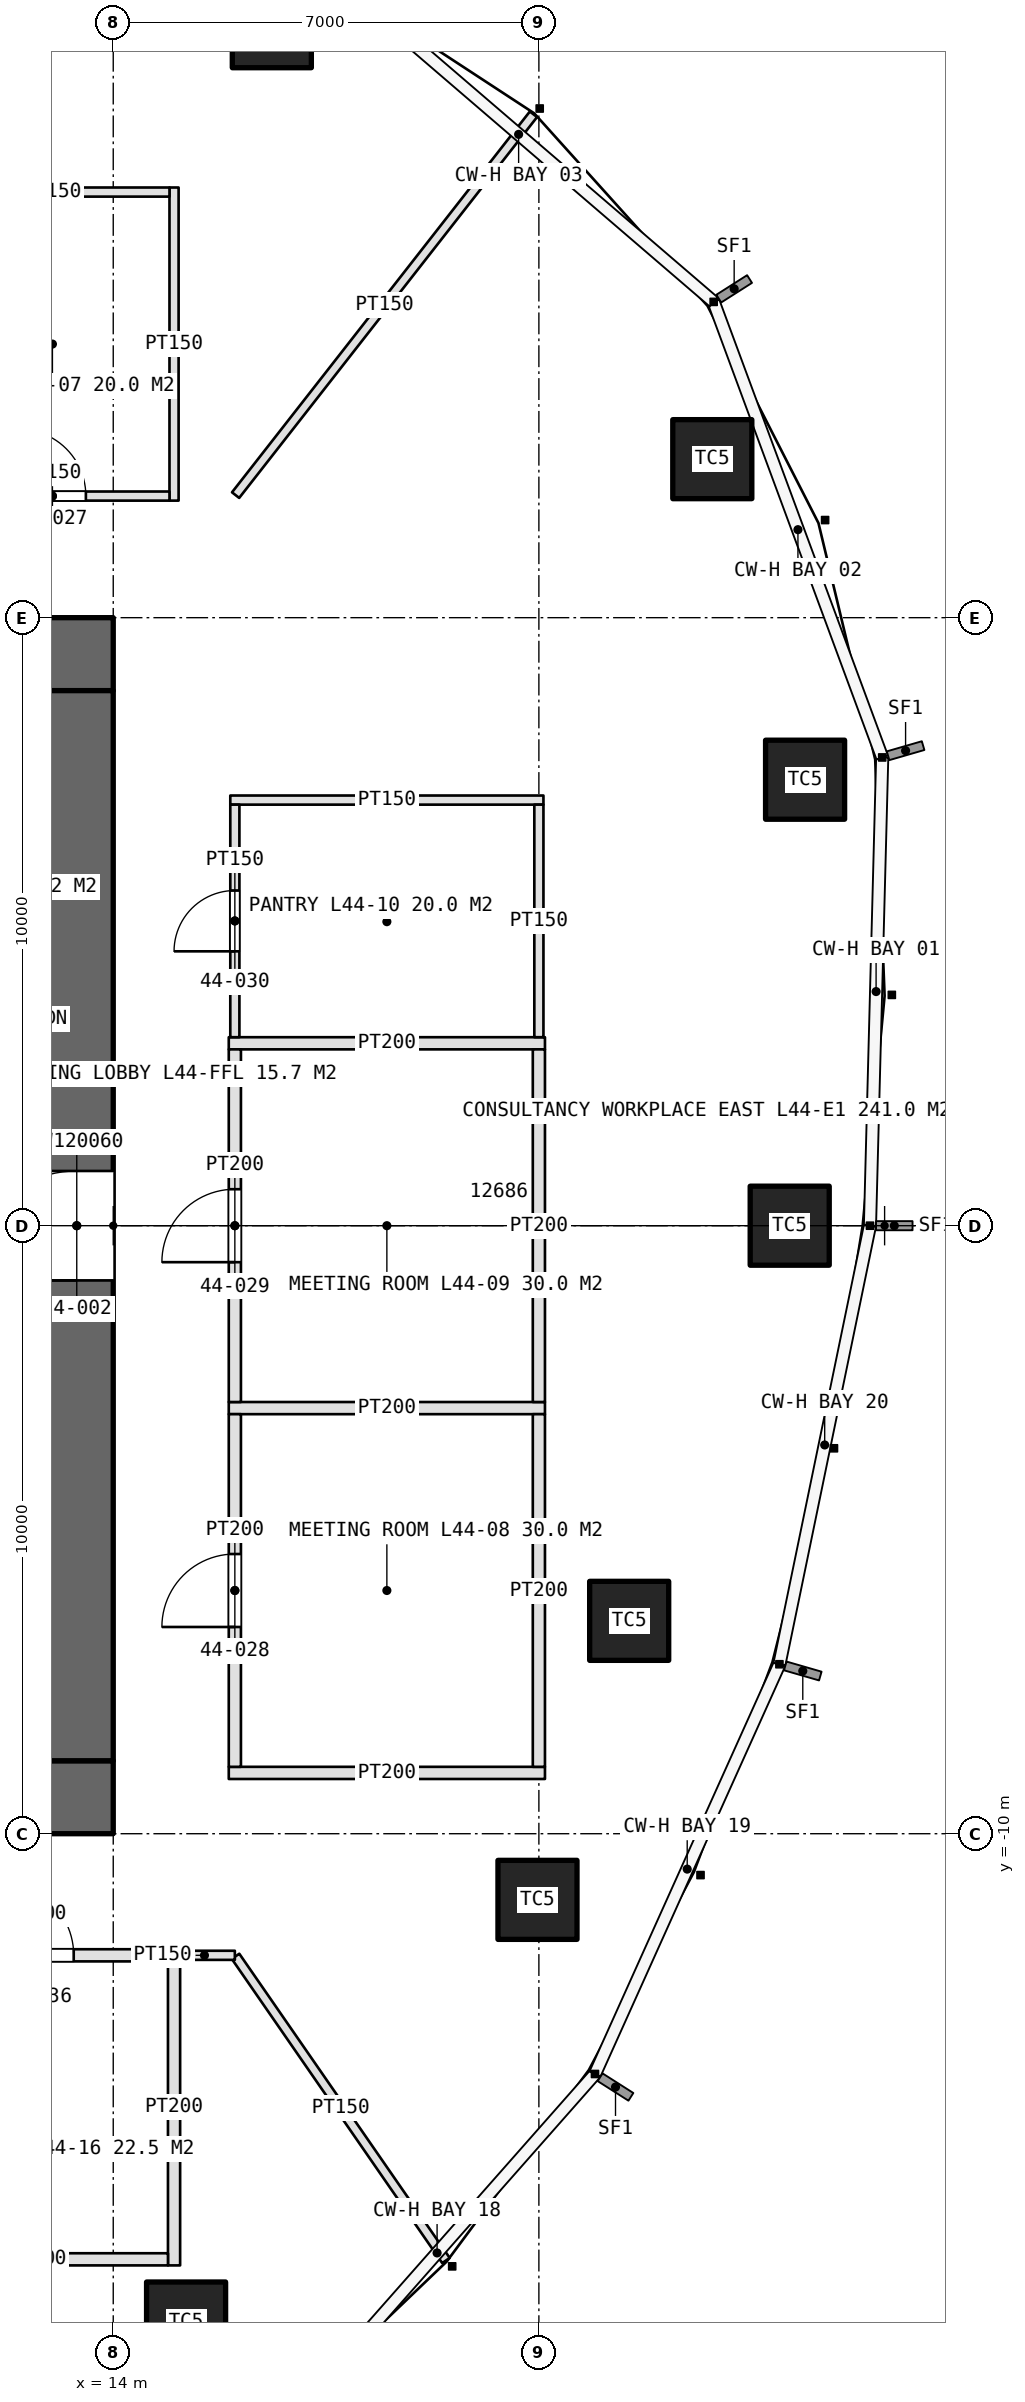
"""IFC4 building model, lengths in metres.
Left out: names, types, materials, properties, quantities, classifications, styles, units other than length and angle.
Written with IfcOpenShell. Run it as: python <this file> out.ifc"""

import sys

from ifc_helpers import new_model, si_unit, direction, frame, frame_2d, origin, origin_2d, place, context, subcontext, project, spatial, rectangle, extrude, element, fill, save


model = new_model("IFC4")
c1 = context("Model", 3, precision=1e-05, world=origin(), true_north=direction((0.0, 1.0)))
c2 = subcontext(c1, "Body", "Model", "MODEL_VIEW")
j1 = project(units=[si_unit("LENGTHUNIT", "METRE"), si_unit("PLANEANGLEUNIT", "RADIAN")], contexts=[c1])
p1 = place(None, origin())
s1 = spatial("IfcSite", under=j1, at=p1, CompositionType="ELEMENT")
p2 = place(p1, origin())
s2 = spatial("IfcBuilding", under=s1, at=p2, CompositionType="ELEMENT")
p3 = place(p2, frame((0.0, 0.0, 203.2)))
s3 = spatial("IfcBuildingStorey", under=s2, at=p3, CompositionType="ELEMENT", Elevation=203.2)
p4 = place(p3, frame((-14.0, -9.4, 0.0), z_axis=(0.0, 0.0, 1.0), x_axis=(1.0, 0.0, 0.0)))
e1 = element("IfcWall", 1, at=p4, inside=s3, PredefinedType="SHEAR", context=c2, shape_type="SweptSolid", body=[
    extrude(rectangle(XDim=28.0, YDim=1.2, at=frame_2d((14.0, 0.0))), origin(), (0.0, 0.0, 1.0), 4.2),
])
p5 = place(p4, frame((22.9, 0.0, 0.0)))
e2 = element("IfcOpeningElement", 2, at=p5, cuts=e1, PredefinedType="OPENING", context=c2, shape_type="SweptSolid", body=[
    extrude(rectangle(XDim=2.2, YDim=2.7, at=frame_2d((1.1, 1.35))), frame((0.0, 0.61, 0.0), z_axis=(0.0, -1.0, 0.0), x_axis=(1.0, 0.0, 0.0)), (0.0, 0.0, 1.0), 1.22),
])
p6 = place(p3, frame((14.0, 9.4, 0.0), z_axis=(0.0, 0.0, 1.0), x_axis=(-1.0, 0.0, 0.0)))
e3 = element("IfcWall", 3, at=p6, inside=s3, PredefinedType="SHEAR", context=c2, shape_type="SweptSolid", body=[
    extrude(rectangle(XDim=28.0, YDim=1.2, at=frame_2d((14.0, 0.0))), origin(), (0.0, 0.0, 1.0), 4.2),
])
p7 = place(p6, frame((24.0, 0.0, 0.0)))
e4 = element("IfcOpeningElement", 4, at=p7, cuts=e3, PredefinedType="OPENING", context=c2, shape_type="SweptSolid", body=[
    extrude(rectangle(XDim=1.0, YDim=2.4, at=frame_2d((0.5, 1.2))), frame((0.0, 0.61, 0.0), z_axis=(0.0, -1.0, 0.0), x_axis=(1.0, 0.0, 0.0)), (0.0, 0.0, 1.0), 1.22),
])
p8 = place(p3, frame((13.4, -8.8, 0.0), z_axis=(0.0, 0.0, 1.0), x_axis=(0.0, 1.0, 0.0)))
e5 = element("IfcWall", 5, at=p8, inside=s3, PredefinedType="SHEAR", context=c2, shape_type="SweptSolid", body=[
    extrude(rectangle(XDim=17.6, YDim=1.2, at=frame_2d((8.8, 0.0))), origin(), (0.0, 0.0, 1.0), 4.2),
])
p9 = place(p8, frame((7.9, 0.0, 0.0)))
e6 = element("IfcOpeningElement", 6, at=p9, cuts=e5, PredefinedType="OPENING", context=c2, shape_type="SweptSolid", body=[
    extrude(rectangle(XDim=1.8, YDim=2.4, at=frame_2d((0.9, 1.2))), frame((0.0, 0.61, 0.0), z_axis=(0.0, -1.0, 0.0), x_axis=(1.0, 0.0, 0.0)), (0.0, 0.0, 1.0), 1.22),
])
for number, where, z_axis, x_axis in (
    (7, (25.125, 0.0, 0.0), (0.0, 0.0, 1.0), (1.0, 0.0, 0.0)),
    (8, (25.378, 7.335, 0.0), (0.0, 0.0, 1.0), (1.0, 0.0, 0.0)),
    (9, (23.852, 12.607, 0.0), (0.0, 0.0, 1.0), (1.0, 0.0, 0.0)),
    (10, (16.608, 19.695, 0.0), (0.0, 0.0, 1.0), (1.0, 0.0, 0.0)),
    (11, (15.198, -18.023, 0.0), (0.0, 0.0, 1.0), (1.0, 0.0, 0.0)),
    (12, (20.977, -11.088, 0.0), (0.0, 0.0, 1.0), (1.0, 0.0, 0.0)),
    (13, (22.485, -6.499, 0.0), (0.0, 0.0, 1.0), (1.0, 0.0, 0.0)),
):
    element("IfcColumn", number, at=place(p3, frame(where, z_axis=z_axis, x_axis=x_axis)), inside=s3, PredefinedType="COLUMN", context=c2, shape_type="SweptSolid", body=[
        extrude(rectangle(XDim=1.3, YDim=1.3, at=origin_2d()), origin(), (0.0, 0.0, 1.0), 4.2),
    ])
p10 = place(p3, frame((15.0, 11.925, 0.0), z_axis=(0.0, 0.0, 1.0), x_axis=(0.0, 1.0, 0.0)))
e14 = element("IfcWall", 14, at=p10, inside=s3, PredefinedType="PARTITIONING", context=c2, shape_type="SweptSolid", body=[
    extrude(rectangle(XDim=5.15, YDim=0.15, at=frame_2d((2.575, 0.0))), origin(), (0.0, 0.0, 1.0), 3.0),
])
p11 = place(p3, frame((11.075, 12.0, 0.0), z_axis=(0.0, 0.0, 1.0), x_axis=(1.0, 0.0, 0.0)))
e15 = element("IfcWall", 15, at=p11, inside=s3, PredefinedType="PARTITIONING", context=c2, shape_type="SweptSolid", body=[
    extrude(rectangle(XDim=3.85, YDim=0.15, at=frame_2d((1.925, 0.0))), origin(), (0.0, 0.0, 1.0), 3.0),
])
p12 = place(p11, frame((1.375, 0.0, 0.0)))
e16 = element("IfcOpeningElement", 16, at=p12, cuts=e15, PredefinedType="OPENING", context=c2, shape_type="SweptSolid", body=[
    extrude(rectangle(XDim=1.1, YDim=2.3, at=frame_2d((0.55, 1.15))), frame((0.0, 0.085, 0.0), z_axis=(0.0, -1.0, 0.0), x_axis=(1.0, 0.0, 0.0)), (0.0, 0.0, 1.0), 0.17),
])
p13 = place(p3, frame((11.075, 17.0, 0.0), z_axis=(0.0, 0.0, 1.0), x_axis=(1.0, 0.0, 0.0)))
e17 = element("IfcWall", 17, at=p13, inside=s3, PredefinedType="PARTITIONING", context=c2, shape_type="SweptSolid", body=[
    extrude(rectangle(XDim=3.85, YDim=0.15, at=frame_2d((1.925, 0.0))), origin(), (0.0, 0.0, 1.0), 3.0),
])
for number, where, z_axis, x_axis in (
    (18, (15.9, -9.0, 0.0), (0.0, 0.0, 1.0), (1.0, 0.0, 0.0)),
    (19, (15.9, -3.0, 0.0), (0.0, 0.0, 1.0), (1.0, 0.0, 0.0)),
    (20, (15.9, 3.0, 0.0), (0.0, 0.0, 1.0), (1.0, 0.0, 0.0)),
):
    element("IfcWall", number, at=place(p3, frame(where, z_axis=z_axis, x_axis=x_axis)), inside=s3, PredefinedType="PARTITIONING", context=c2, shape_type="SweptSolid", body=[
        extrude(rectangle(XDim=5.2, YDim=0.2, at=frame_2d((2.6, 0.0))), origin(), (0.0, 0.0, 1.0), 3.0),
    ])
p14 = place(p3, frame((15.925, 7.0, 0.0), z_axis=(0.0, 0.0, 1.0), x_axis=(1.0, 0.0, 0.0)))
e21 = element("IfcWall", 21, at=p14, inside=s3, PredefinedType="PARTITIONING", context=c2, shape_type="SweptSolid", body=[
    extrude(rectangle(XDim=5.15, YDim=0.15, at=frame_2d((2.575, 0.0))), origin(), (0.0, 0.0, 1.0), 3.0),
])
p15 = place(p3, frame((16.0, -8.9, 0.0), z_axis=(0.0, 0.0, 1.0), x_axis=(0.0, 1.0, 0.0)))
e22 = element("IfcWall", 22, at=p15, inside=s3, PredefinedType="PARTITIONING", context=c2, shape_type="SweptSolid", body=[
    extrude(rectangle(XDim=5.8, YDim=0.2, at=frame_2d((2.9, 0.0))), origin(), (0.0, 0.0, 1.0), 3.0),
])
p16 = place(p15, frame((2.3, 0.0, 0.0)))
e23 = element("IfcOpeningElement", 23, at=p16, cuts=e22, PredefinedType="OPENING", context=c2, shape_type="SweptSolid", body=[
    extrude(rectangle(XDim=1.2, YDim=2.4, at=frame_2d((0.6, 1.2))), frame((0.0, 0.11, 0.0), z_axis=(0.0, -1.0, 0.0), x_axis=(1.0, 0.0, 0.0)), (0.0, 0.0, 1.0), 0.22),
])
p17 = place(p3, frame((21.0, -8.9, 0.0), z_axis=(0.0, 0.0, 1.0), x_axis=(0.0, 1.0, 0.0)))
e24 = element("IfcWall", 24, at=p17, inside=s3, PredefinedType="PARTITIONING", context=c2, shape_type="SweptSolid", body=[
    extrude(rectangle(XDim=5.8, YDim=0.2, at=frame_2d((2.9, 0.0))), origin(), (0.0, 0.0, 1.0), 3.0),
])
p18 = place(p3, frame((16.0, -2.9, 0.0), z_axis=(0.0, 0.0, 1.0), x_axis=(0.0, 1.0, 0.0)))
e25 = element("IfcWall", 25, at=p18, inside=s3, PredefinedType="PARTITIONING", context=c2, shape_type="SweptSolid", body=[
    extrude(rectangle(XDim=5.8, YDim=0.2, at=frame_2d((2.9, 0.0))), origin(), (0.0, 0.0, 1.0), 3.0),
])
p19 = place(p18, frame((2.3, 0.0, 0.0)))
e26 = element("IfcOpeningElement", 26, at=p19, cuts=e25, PredefinedType="OPENING", context=c2, shape_type="SweptSolid", body=[
    extrude(rectangle(XDim=1.2, YDim=2.4, at=frame_2d((0.6, 1.2))), frame((0.0, 0.11, 0.0), z_axis=(0.0, -1.0, 0.0), x_axis=(1.0, 0.0, 0.0)), (0.0, 0.0, 1.0), 0.22),
])
p20 = place(p3, frame((21.0, -2.9, 0.0), z_axis=(0.0, 0.0, 1.0), x_axis=(0.0, 1.0, 0.0)))
e27 = element("IfcWall", 27, at=p20, inside=s3, PredefinedType="PARTITIONING", context=c2, shape_type="SweptSolid", body=[
    extrude(rectangle(XDim=5.8, YDim=0.2, at=frame_2d((2.9, 0.0))), origin(), (0.0, 0.0, 1.0), 3.0),
])
p21 = place(p3, frame((16.0, 3.1, 0.0), z_axis=(0.0, 0.0, 1.0), x_axis=(0.0, 1.0, 0.0)))
e28 = element("IfcWall", 28, at=p21, inside=s3, PredefinedType="PARTITIONING", context=c2, shape_type="SweptSolid", body=[
    extrude(rectangle(XDim=3.825, YDim=0.15, at=frame_2d((1.913, 0.0))), origin(), (0.0, 0.0, 1.0), 3.0),
])
p22 = place(p21, frame((1.413, 0.0, 0.0)))
e29 = element("IfcOpeningElement", 29, at=p22, cuts=e28, PredefinedType="OPENING", context=c2, shape_type="SweptSolid", body=[
    extrude(rectangle(XDim=1.0, YDim=2.2, at=frame_2d((0.5, 1.1))), frame((0.0, 0.085, 0.0), z_axis=(0.0, -1.0, 0.0), x_axis=(1.0, 0.0, 0.0)), (0.0, 0.0, 1.0), 0.17),
])
p23 = place(p3, frame((21.0, 3.1, 0.0), z_axis=(0.0, 0.0, 1.0), x_axis=(0.0, 1.0, 0.0)))
e30 = element("IfcWall", 30, at=p23, inside=s3, PredefinedType="PARTITIONING", context=c2, shape_type="SweptSolid", body=[
    extrude(rectangle(XDim=3.825, YDim=0.15, at=frame_2d((1.913, 0.0))), origin(), (0.0, 0.0, 1.0), 3.0),
])
p24 = place(p3, frame((15.0, -11.9, 0.0), z_axis=(0.0, 0.0, 1.0), x_axis=(0.0, -1.0, 0.0)))
e31 = element("IfcWall", 31, at=p24, inside=s3, PredefinedType="PARTITIONING", context=c2, shape_type="SweptSolid", body=[
    extrude(rectangle(XDim=5.2, YDim=0.2, at=frame_2d((2.6, 0.0))), origin(), (0.0, 0.0, 1.0), 3.0),
])
p25 = place(p3, frame((10.6, -12.0, 0.0), z_axis=(0.0, 0.0, 1.0), x_axis=(1.0, 0.0, 0.0)))
e32 = element("IfcWall", 32, at=p25, inside=s3, PredefinedType="PARTITIONING", context=c2, shape_type="SweptSolid", body=[
    extrude(rectangle(XDim=4.3, YDim=0.2, at=frame_2d((2.15, 0.0))), origin(), (0.0, 0.0, 1.0), 3.0),
])
p26 = place(p25, frame((1.55, 0.0, 0.0)))
e33 = element("IfcOpeningElement", 33, at=p26, cuts=e32, PredefinedType="OPENING", context=c2, shape_type="SweptSolid", body=[
    extrude(rectangle(XDim=1.2, YDim=2.4, at=frame_2d((0.6, 1.2))), frame((0.0, 0.11, 0.0), z_axis=(0.0, -1.0, 0.0), x_axis=(1.0, 0.0, 0.0)), (0.0, 0.0, 1.0), 0.22),
])
p27 = place(p3, frame((10.6, -17.0, 0.0), z_axis=(0.0, 0.0, 1.0), x_axis=(1.0, 0.0, 0.0)))
e34 = element("IfcWall", 34, at=p27, inside=s3, PredefinedType="PARTITIONING", context=c2, shape_type="SweptSolid", body=[
    extrude(rectangle(XDim=4.3, YDim=0.2, at=frame_2d((2.15, 0.0))), origin(), (0.0, 0.0, 1.0), 3.0),
])
p28 = place(p3, frame((16.011, -12.016, 0.0), z_axis=(0.0, 0.0, 1.0), x_axis=(0.568863489071, -0.822431961199, 0.0)))
e35 = element("IfcWall", 35, at=p28, inside=s3, PredefinedType="PARTITIONING", context=c2, shape_type="SweptSolid", body=[
    extrude(rectangle(XDim=6.083, YDim=0.15, at=frame_2d((3.042, 0.0))), origin(), (0.0, 0.0, 1.0), 3.0),
])
p29 = place(p3, frame((16.012, 12.016, 0.0), z_axis=(0.0, 0.0, 1.0), x_axis=(0.616030058222, 0.787722646219, 0.0)))
e36 = element("IfcWall", 36, at=p29, inside=s3, PredefinedType="PARTITIONING", context=c2, shape_type="SweptSolid", body=[
    extrude(rectangle(XDim=7.952, YDim=0.15, at=frame_2d((3.976, 0.0))), origin(), (0.0, 0.0, 1.0), 3.0),
])
p30 = place(p3, frame((15.0, -12.0, 0.0), z_axis=(0.0, 0.0, 1.0), x_axis=(1.0, 0.0, 0.0)))
e37 = element("IfcWall", 37, at=p30, inside=s3, PredefinedType="PARTITIONING", context=c2, shape_type="SweptSolid", body=[
    extrude(rectangle(XDim=1.0, YDim=0.15, at=frame_2d((0.5, 0.0))), origin(), (0.0, 0.0, 1.0), 3.0),
])
p31 = place(p9, origin())
e38 = element("IfcDoor", 38, at=p31, inside=s3, OperationType="DOUBLE_DOOR_SINGLE_SWING", PredefinedType="DOOR", context=c2, shape_type="SweptSolid", body=[
    extrude(rectangle(XDim=1.8, YDim=2.4, at=frame_2d((0.9, 1.2))), frame((0.0, 0.025, 0.0), z_axis=(0.0, -1.0, 0.0), x_axis=(1.0, 0.0, 0.0)), (0.0, 0.0, 1.0), 0.05),
])
fill(e6, e38)
p32 = place(p12, origin())
e39 = element("IfcDoor", 39, at=p32, inside=s3, OperationType="SINGLE_SWING_LEFT", PredefinedType="DOOR", context=c2, shape_type="SweptSolid", body=[
    extrude(rectangle(XDim=1.1, YDim=2.3, at=frame_2d((0.55, 1.15))), frame((0.0, 0.025, 0.0), z_axis=(0.0, -1.0, 0.0), x_axis=(1.0, 0.0, 0.0)), (0.0, 0.0, 1.0), 0.05),
])
fill(e16, e39)
p33 = place(p16, origin())
e40 = element("IfcDoor", 40, at=p33, inside=s3, OperationType="SINGLE_SWING_LEFT", PredefinedType="DOOR", context=c2, shape_type="SweptSolid", body=[
    extrude(rectangle(XDim=1.2, YDim=2.4, at=frame_2d((0.6, 1.2))), frame((0.0, 0.025, 0.0), z_axis=(0.0, -1.0, 0.0), x_axis=(1.0, 0.0, 0.0)), (0.0, 0.0, 1.0), 0.05),
])
fill(e23, e40)
p34 = place(p19, origin())
e41 = element("IfcDoor", 41, at=p34, inside=s3, OperationType="SINGLE_SWING_LEFT", PredefinedType="DOOR", context=c2, shape_type="SweptSolid", body=[
    extrude(rectangle(XDim=1.2, YDim=2.4, at=frame_2d((0.6, 1.2))), frame((0.0, 0.025, 0.0), z_axis=(0.0, -1.0, 0.0), x_axis=(1.0, 0.0, 0.0)), (0.0, 0.0, 1.0), 0.05),
])
fill(e26, e41)
p35 = place(p22, origin())
e42 = element("IfcDoor", 42, at=p35, inside=s3, OperationType="SINGLE_SWING_LEFT", PredefinedType="DOOR", context=c2, shape_type="SweptSolid", body=[
    extrude(rectangle(XDim=1.0, YDim=2.2, at=frame_2d((0.5, 1.1))), frame((0.0, 0.025, 0.0), z_axis=(0.0, -1.0, 0.0), x_axis=(1.0, 0.0, 0.0)), (0.0, 0.0, 1.0), 0.05),
])
fill(e29, e42)
p36 = place(p26, origin())
e43 = element("IfcDoor", 43, at=p36, inside=s3, OperationType="SINGLE_SWING_LEFT", PredefinedType="DOOR", context=c2, shape_type="SweptSolid", body=[
    extrude(rectangle(XDim=1.2, YDim=2.4, at=frame_2d((0.6, 1.2))), frame((0.0, 0.025, 0.0), z_axis=(0.0, -1.0, 0.0), x_axis=(1.0, 0.0, 0.0)), (0.0, 0.0, 1.0), 0.05),
])
fill(e33, e43)
save(model, sys.argv[1])
